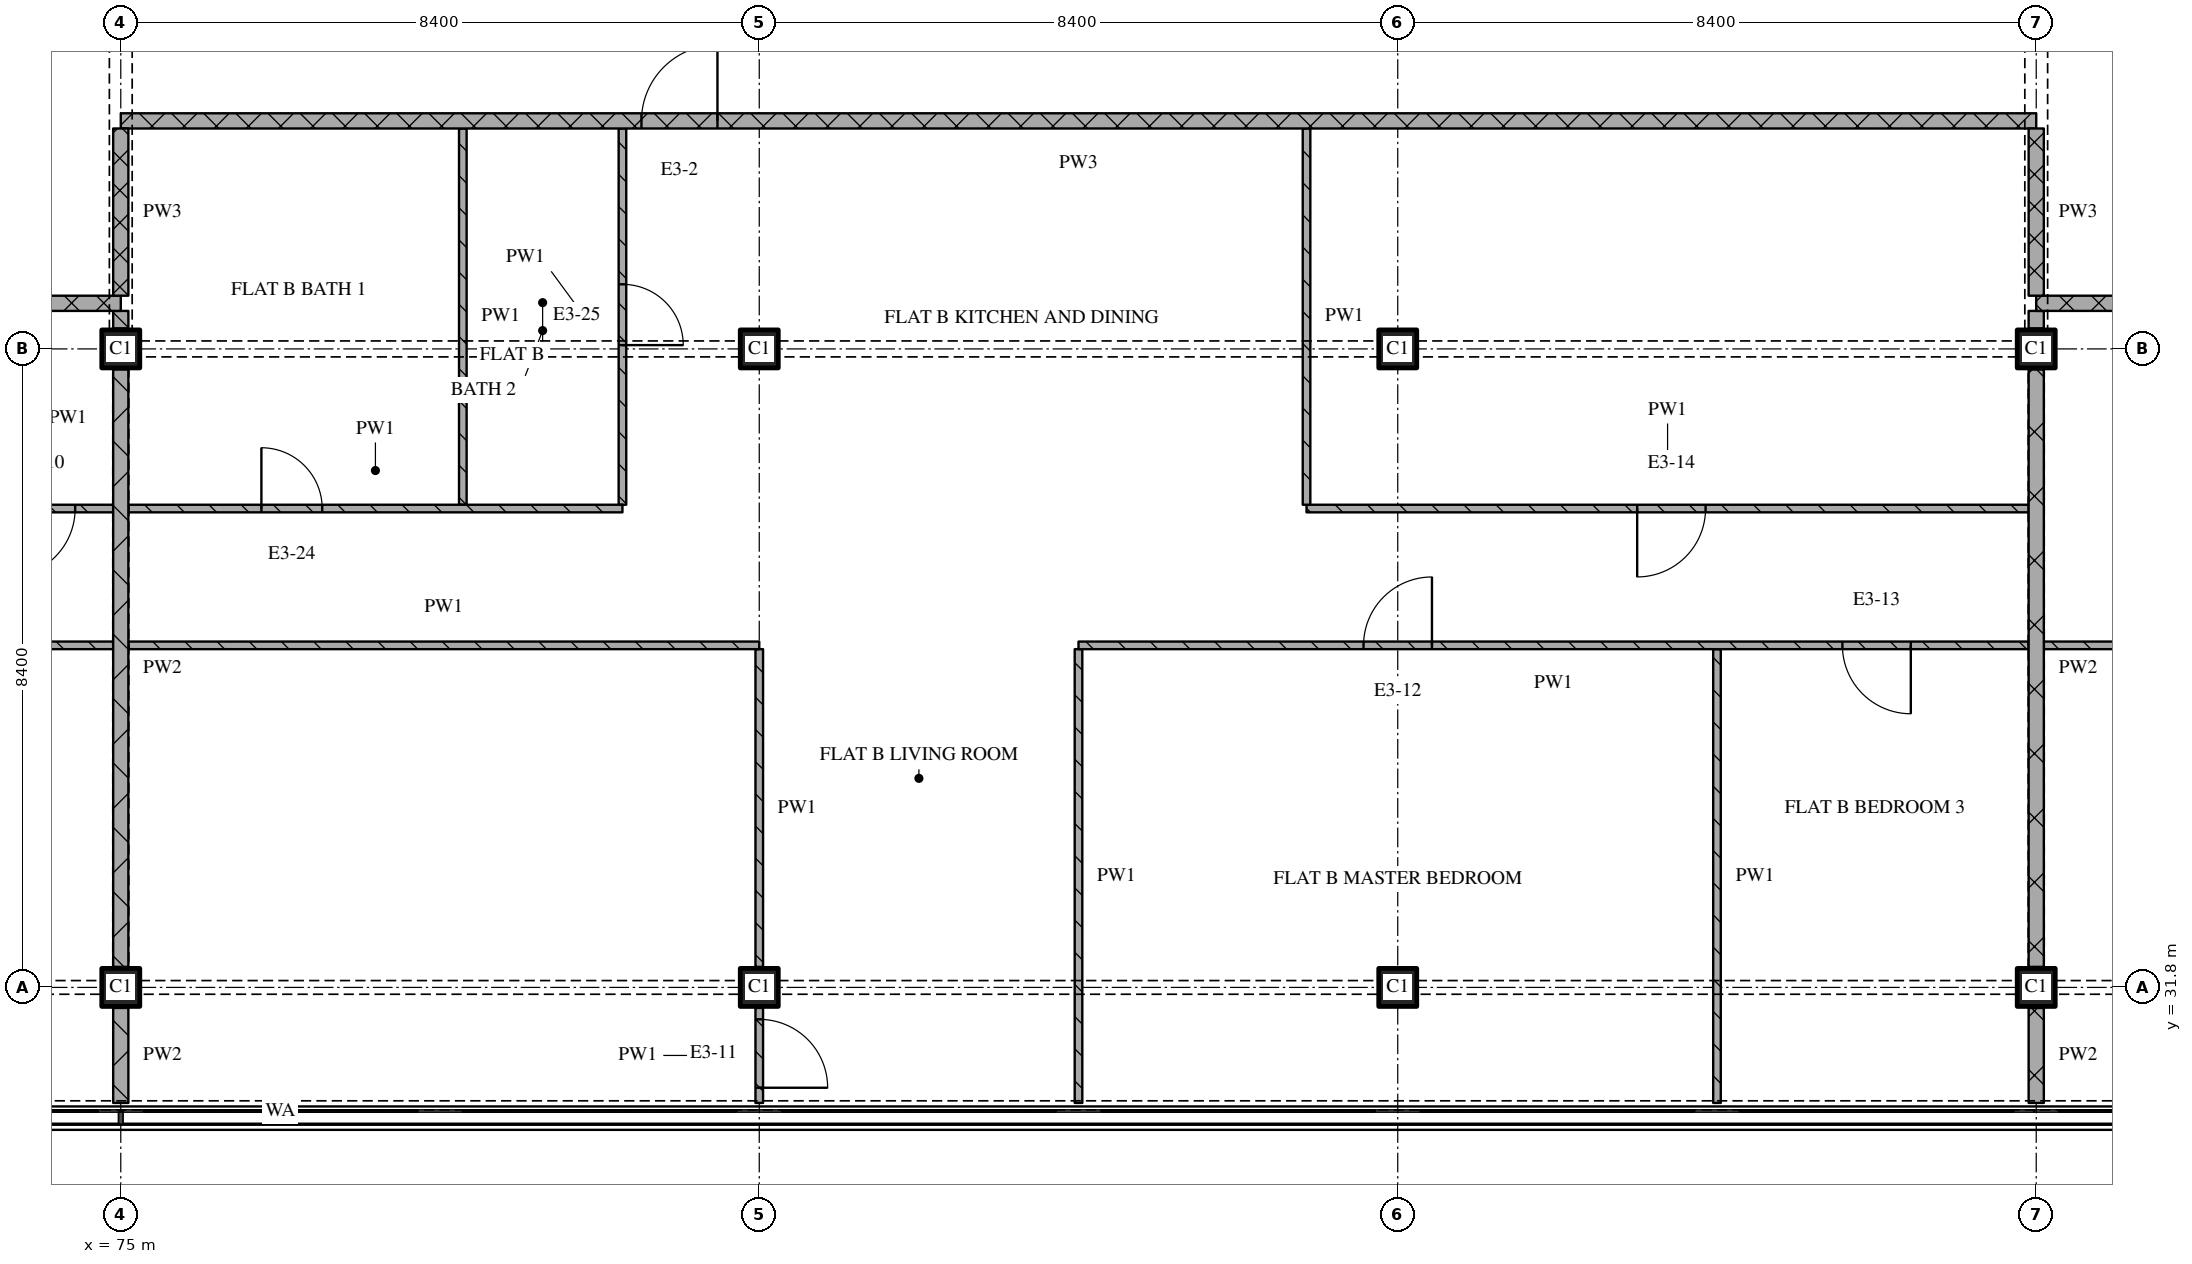
"""IFC4 building model, lengths in metres.
Left out: names, types, materials, properties, quantities, classifications, styles, units other than length and angle.
Written with IfcOpenShell. Run it as: python <this file> out.ifc"""

import sys

from ifc_helpers import new_model, si_unit, direction, frame, frame_2d, origin, origin_2d, place, context, subcontext, project, spatial, rectangle, extrude, element, fill, save


model = new_model("IFC4")
c1 = context("Model", 3, precision=1e-05, world=origin(), true_north=direction((0.0, 1.0)))
c2 = subcontext(c1, "Body", "Model", "MODEL_VIEW")
j1 = project(units=[si_unit("LENGTHUNIT", "METRE"), si_unit("PLANEANGLEUNIT", "RADIAN")], contexts=[c1])
p1 = place(None, origin())
s1 = spatial("IfcSite", under=j1, at=p1, CompositionType="ELEMENT")
p2 = place(p1, origin())
s2 = spatial("IfcBuilding", under=s1, at=p2, CompositionType="ELEMENT")
p3 = place(p2, frame((0.0, 0.0, 274.35)))
s3 = spatial("IfcBuildingStorey", under=s2, at=p3, CompositionType="ELEMENT", Elevation=274.35)
for number, where, z_axis, x_axis in (
    (1, (75.0, 31.8, 0.0), (0.0, 0.0, 1.0), (1.0, 0.0, 0.0)),
    (2, (75.0, 40.2, 0.0), (0.0, 0.0, 1.0), (1.0, 0.0, 0.0)),
    (3, (83.4, 31.8, 0.0), (0.0, 0.0, 1.0), (1.0, 0.0, 0.0)),
    (4, (83.4, 40.2, 0.0), (0.0, 0.0, 1.0), (1.0, 0.0, 0.0)),
    (5, (91.8, 31.8, 0.0), (0.0, 0.0, 1.0), (1.0, 0.0, 0.0)),
    (6, (91.8, 40.2, 0.0), (0.0, 0.0, 1.0), (1.0, 0.0, 0.0)),
    (7, (100.2, 31.8, 0.0), (0.0, 0.0, 1.0), (1.0, 0.0, 0.0)),
    (8, (100.2, 40.2, 0.0), (0.0, 0.0, 1.0), (1.0, 0.0, 0.0)),
):
    element("IfcColumn", number, at=place(p3, frame(where, z_axis=z_axis, x_axis=x_axis)), inside=s3, PredefinedType="COLUMN", context=c2, shape_type="SweptSolid", body=[
        extrude(rectangle(XDim=0.5, YDim=0.5, at=origin_2d()), origin(), (0.0, 0.0, 1.0), 3.6),
    ])
p4 = place(p3, frame((90.6, 38.1, 0.0), z_axis=(0.0, 0.0, 1.0), x_axis=(1.0, 0.0, 0.0)))
e9 = element("IfcWall", 9, at=p4, inside=s3, PredefinedType="PARTITIONING", context=c2, shape_type="SweptSolid", body=[
    extrude(rectangle(XDim=9.5, YDim=0.1, at=frame_2d((4.75, 0.0))), origin(), (0.0, 0.0, 1.0), 3.32),
])
p5 = place(p4, frame((4.35, 0.0, 0.0)))
e10 = element("IfcOpeningElement", 10, at=p5, cuts=e9, PredefinedType="OPENING", context=c2, shape_type="SweptSolid", body=[
    extrude(rectangle(XDim=0.9, YDim=2.1, at=frame_2d((0.45, 1.05))), frame((0.0, 0.06, 0.0), z_axis=(0.0, -1.0, 0.0), x_axis=(1.0, 0.0, 0.0)), (0.0, 0.0, 1.0), 0.12),
])
p6 = place(p3, frame((75.0, 40.8, 0.0), z_axis=(0.0, 0.0, 1.0), x_axis=(-1.0, 0.0, 0.0)))
e11 = element("IfcWall", 11, at=p6, inside=s3, PredefinedType="PARTITIONING", context=c2, shape_type="SweptSolid", body=[
    extrude(rectangle(XDim=18.32, YDim=0.2, at=frame_2d((9.16, 0.0))), origin(), (0.0, 0.0, 1.0), 3.32),
])
p7 = place(p6, frame((9.85, 0.0, 0.0)))
e12 = element("IfcOpeningElement", 12, at=p7, cuts=e11, PredefinedType="OPENING", context=c2, shape_type="SweptSolid", body=[
    extrude(rectangle(XDim=1.0, YDim=2.1, at=frame_2d((0.5, 1.05))), frame((0.0, 0.11, 0.0), z_axis=(0.0, -1.0, 0.0), x_axis=(1.0, 0.0, 0.0)), (0.0, 0.0, 1.0), 0.22),
])
p8 = place(p3, frame((118.52, 40.8, 0.0), z_axis=(0.0, 0.0, 1.0), x_axis=(-1.0, 0.0, 0.0)))
e13 = element("IfcWall", 13, at=p8, inside=s3, PredefinedType="PARTITIONING", context=c2, shape_type="SweptSolid", body=[
    extrude(rectangle(XDim=18.32, YDim=0.2, at=frame_2d((9.16, 0.0))), origin(), (0.0, 0.0, 1.0), 3.32),
])
p9 = place(p8, frame((7.77, 0.0, 0.0)))
e14 = element("IfcOpeningElement", 14, at=p9, cuts=e13, PredefinedType="OPENING", context=c2, shape_type="SweptSolid", body=[
    extrude(rectangle(XDim=1.0, YDim=2.1, at=frame_2d((0.5, 1.05))), frame((0.0, 0.11, 0.0), z_axis=(0.0, -1.0, 0.0), x_axis=(1.0, 0.0, 0.0)), (0.0, 0.0, 1.0), 0.22),
])
p10 = place(p3, frame((100.2, 43.2, 0.0), z_axis=(0.0, 0.0, 1.0), x_axis=(-1.0, 0.0, 0.0)))
e15 = element("IfcWall", 15, at=p10, inside=s3, PredefinedType="PARTITIONING", context=c2, shape_type="SweptSolid", body=[
    extrude(rectangle(XDim=25.2, YDim=0.2, at=frame_2d((12.6, 0.0))), origin(), (0.0, 0.0, 1.0), 3.32),
])
p11 = place(p10, frame((17.35, 0.0, 0.0)))
e16 = element("IfcOpeningElement", 16, at=p11, cuts=e15, PredefinedType="OPENING", context=c2, shape_type="SweptSolid", body=[
    extrude(rectangle(XDim=1.0, YDim=2.1, at=frame_2d((0.5, 1.05))), frame((0.0, 0.11, 0.0), z_axis=(0.0, -1.0, 0.0), x_axis=(1.0, 0.0, 0.0)), (0.0, 0.0, 1.0), 0.22),
])
p12 = place(p3, frame((75.0, 43.1, 0.0), z_axis=(0.0, 0.0, 1.0), x_axis=(0.0, -1.0, 0.0)))
e17 = element("IfcWall", 17, at=p12, inside=s3, PredefinedType="PARTITIONING", context=c2, shape_type="SweptSolid", body=[
    extrude(rectangle(XDim=2.2, YDim=0.2, at=frame_2d((1.1, 0.0))), origin(), (0.0, 0.0, 1.0), 2.53),
])
p13 = place(p3, frame((75.0, 31.53, 0.0), z_axis=(0.0, 0.0, 1.0), x_axis=(0.0, -1.0, 0.0)))
e18 = element("IfcWall", 18, at=p13, inside=s3, PredefinedType="PARTITIONING", context=c2, shape_type="SweptSolid", body=[
    extrude(rectangle(XDim=1.25, YDim=0.2, at=frame_2d((0.625, 0.0))), origin(), (0.0, 0.0, 1.0), 3.32),
])
p14 = place(p3, frame((75.0, 39.93, 0.0), z_axis=(0.0, 0.0, 1.0), x_axis=(0.0, -1.0, 0.0)))
e19 = element("IfcWall", 19, at=p14, inside=s3, PredefinedType="PARTITIONING", context=c2, shape_type="SweptSolid", body=[
    extrude(rectangle(XDim=7.86, YDim=0.2, at=frame_2d((3.93, 0.0))), origin(), (0.0, 0.0, 1.0), 2.77),
])
p15 = place(p3, frame((75.0, 40.7, 0.0), z_axis=(0.0, 0.0, 1.0), x_axis=(0.0, -1.0, 0.0)))
e20 = element("IfcWall", 20, at=p15, inside=s3, PredefinedType="PARTITIONING", context=c2, shape_type="SweptSolid", body=[
    extrude(rectangle(XDim=0.23, YDim=0.2, at=frame_2d((0.115, 0.0))), origin(), (0.0, 0.0, 1.0), 3.32),
])
p16 = place(p3, frame((79.5, 43.1, 0.0), z_axis=(0.0, 0.0, 1.0), x_axis=(0.0, -1.0, 0.0)))
e21 = element("IfcWall", 21, at=p16, inside=s3, PredefinedType="PARTITIONING", context=c2, shape_type="SweptSolid", body=[
    extrude(rectangle(XDim=4.95, YDim=0.1, at=frame_2d((2.475, 0.0))), origin(), (0.0, 0.0, 1.0), 3.32),
])
p17 = place(p3, frame((81.6, 38.15, 0.0), z_axis=(0.0, 0.0, 1.0), x_axis=(0.0, 1.0, 0.0)))
e22 = element("IfcWall", 22, at=p17, inside=s3, PredefinedType="PARTITIONING", context=c2, shape_type="SweptSolid", body=[
    extrude(rectangle(XDim=4.95, YDim=0.1, at=frame_2d((2.475, 0.0))), origin(), (0.0, 0.0, 1.0), 3.32),
])
p18 = place(p17, frame((2.1, 0.0, 0.0)))
e23 = element("IfcOpeningElement", 23, at=p18, cuts=e22, PredefinedType="OPENING", context=c2, shape_type="SweptSolid", body=[
    extrude(rectangle(XDim=0.8, YDim=2.1, at=frame_2d((0.4, 1.05))), frame((0.0, 0.06, 0.0), z_axis=(0.0, -1.0, 0.0), x_axis=(1.0, 0.0, 0.0)), (0.0, 0.0, 1.0), 0.12),
])
p19 = place(p3, frame((83.4, 30.28, 0.0), z_axis=(0.0, 0.0, 1.0), x_axis=(0.0, 1.0, 0.0)))
e24 = element("IfcWall", 24, at=p19, inside=s3, PredefinedType="PARTITIONING", context=c2, shape_type="SweptSolid", body=[
    extrude(rectangle(XDim=1.25, YDim=0.1, at=frame_2d((0.625, 0.0))), origin(), (0.0, 0.0, 1.0), 3.32),
])
p20 = place(p19, frame((0.2, 0.0, 0.0)))
e25 = element("IfcOpeningElement", 25, at=p20, cuts=e24, PredefinedType="OPENING", context=c2, shape_type="SweptSolid", body=[
    extrude(rectangle(XDim=0.9, YDim=2.1, at=frame_2d((0.45, 1.05))), frame((0.0, 0.06, 0.0), z_axis=(0.0, -1.0, 0.0), x_axis=(1.0, 0.0, 0.0)), (0.0, 0.0, 1.0), 0.12),
])
p21 = place(p3, frame((83.4, 36.25, 0.0), z_axis=(0.0, 0.0, 1.0), x_axis=(0.0, -1.0, 0.0)))
e26 = element("IfcWall", 26, at=p21, inside=s3, PredefinedType="PARTITIONING", context=c2, shape_type="SweptSolid", body=[
    extrude(rectangle(XDim=4.18, YDim=0.1, at=frame_2d((2.09, 0.0))), origin(), (0.0, 0.0, 1.0), 3.32),
])
p22 = place(p3, frame((87.6, 36.25, 0.0), z_axis=(0.0, 0.0, 1.0), x_axis=(0.0, -1.0, 0.0)))
e27 = element("IfcWall", 27, at=p22, inside=s3, PredefinedType="PARTITIONING", context=c2, shape_type="SweptSolid", body=[
    extrude(rectangle(XDim=5.97, YDim=0.1, at=frame_2d((2.985, 0.0))), origin(), (0.0, 0.0, 1.0), 3.32),
])
p23 = place(p3, frame((90.6, 43.1, 0.0), z_axis=(0.0, 0.0, 1.0), x_axis=(0.0, -1.0, 0.0)))
e28 = element("IfcWall", 28, at=p23, inside=s3, PredefinedType="PARTITIONING", context=c2, shape_type="SweptSolid", body=[
    extrude(rectangle(XDim=4.95, YDim=0.1, at=frame_2d((2.475, 0.0))), origin(), (0.0, 0.0, 1.0), 3.32),
])
p24 = place(p3, frame((96.0, 36.25, 0.0), z_axis=(0.0, 0.0, 1.0), x_axis=(0.0, -1.0, 0.0)))
e29 = element("IfcWall", 29, at=p24, inside=s3, PredefinedType="PARTITIONING", context=c2, shape_type="SweptSolid", body=[
    extrude(rectangle(XDim=5.97, YDim=0.1, at=frame_2d((2.985, 0.0))), origin(), (0.0, 0.0, 1.0), 3.32),
])
p25 = place(p3, frame((100.2, 43.1, 0.0), z_axis=(0.0, 0.0, 1.0), x_axis=(0.0, -1.0, 0.0)))
e30 = element("IfcWall", 30, at=p25, inside=s3, PredefinedType="PARTITIONING", context=c2, shape_type="SweptSolid", body=[
    extrude(rectangle(XDim=2.2, YDim=0.2, at=frame_2d((1.1, 0.0))), origin(), (0.0, 0.0, 1.0), 2.53),
])
p26 = place(p3, frame((100.2, 31.53, 0.0), z_axis=(0.0, 0.0, 1.0), x_axis=(0.0, -1.0, 0.0)))
e31 = element("IfcWall", 31, at=p26, inside=s3, PredefinedType="PARTITIONING", context=c2, shape_type="SweptSolid", body=[
    extrude(rectangle(XDim=1.25, YDim=0.2, at=frame_2d((0.625, 0.0))), origin(), (0.0, 0.0, 1.0), 3.32),
])
p27 = place(p3, frame((100.2, 39.93, 0.0), z_axis=(0.0, 0.0, 1.0), x_axis=(0.0, -1.0, 0.0)))
e32 = element("IfcWall", 32, at=p27, inside=s3, PredefinedType="PARTITIONING", context=c2, shape_type="SweptSolid", body=[
    extrude(rectangle(XDim=7.86, YDim=0.2, at=frame_2d((3.93, 0.0))), origin(), (0.0, 0.0, 1.0), 2.77),
])
p28 = place(p3, frame((100.2, 40.7, 0.0), z_axis=(0.0, 0.0, 1.0), x_axis=(0.0, -1.0, 0.0)))
e33 = element("IfcWall", 33, at=p28, inside=s3, PredefinedType="PARTITIONING", context=c2, shape_type="SweptSolid", body=[
    extrude(rectangle(XDim=0.23, YDim=0.2, at=frame_2d((0.115, 0.0))), origin(), (0.0, 0.0, 1.0), 3.32),
])
p29 = place(p3, frame((74.9, 36.3, 0.0), z_axis=(0.0, 0.0, 1.0), x_axis=(-1.0, 0.0, 0.0)))
e34 = element("IfcWall", 34, at=p29, inside=s3, PredefinedType="PARTITIONING", context=c2, shape_type="SweptSolid", body=[
    extrude(rectangle(XDim=8.3, YDim=0.1, at=frame_2d((4.15, 0.0))), origin(), (0.0, 0.0, 1.0), 3.32),
])
p30 = place(p29, frame((3.65, 0.0, 0.0)))
e35 = element("IfcOpeningElement", 35, at=p30, cuts=e34, PredefinedType="OPENING", context=c2, shape_type="SweptSolid", body=[
    extrude(rectangle(XDim=0.9, YDim=2.1, at=frame_2d((0.45, 1.05))), frame((0.0, 0.06, 0.0), z_axis=(0.0, -1.0, 0.0), x_axis=(1.0, 0.0, 0.0)), (0.0, 0.0, 1.0), 0.12),
])
p31 = place(p3, frame((75.1, 36.3, 0.0), z_axis=(0.0, 0.0, 1.0), x_axis=(1.0, 0.0, 0.0)))
e36 = element("IfcWall", 36, at=p31, inside=s3, PredefinedType="PARTITIONING", context=c2, shape_type="SweptSolid", body=[
    extrude(rectangle(XDim=8.3, YDim=0.1, at=frame_2d((4.15, 0.0))), origin(), (0.0, 0.0, 1.0), 3.32),
])
p32 = place(p3, frame((100.1, 36.3, 0.0), z_axis=(0.0, 0.0, 1.0), x_axis=(-1.0, 0.0, 0.0)))
e37 = element("IfcWall", 37, at=p32, inside=s3, PredefinedType="PARTITIONING", context=c2, shape_type="SweptSolid", body=[
    extrude(rectangle(XDim=12.5, YDim=0.1, at=frame_2d((6.25, 0.0))), origin(), (0.0, 0.0, 1.0), 3.32),
])
p33 = place(p32, frame((1.55, 0.0, 0.0)))
e38 = element("IfcOpeningElement", 38, at=p33, cuts=e37, PredefinedType="OPENING", context=c2, shape_type="SweptSolid", body=[
    extrude(rectangle(XDim=0.9, YDim=2.1, at=frame_2d((0.45, 1.05))), frame((0.0, 0.06, 0.0), z_axis=(0.0, -1.0, 0.0), x_axis=(1.0, 0.0, 0.0)), (0.0, 0.0, 1.0), 0.12),
])
p34 = place(p32, frame((7.85, 0.0, 0.0)))
e39 = element("IfcOpeningElement", 39, at=p34, cuts=e37, PredefinedType="OPENING", context=c2, shape_type="SweptSolid", body=[
    extrude(rectangle(XDim=0.9, YDim=2.1, at=frame_2d((0.45, 1.05))), frame((0.0, 0.06, 0.0), z_axis=(0.0, -1.0, 0.0), x_axis=(1.0, 0.0, 0.0)), (0.0, 0.0, 1.0), 0.12),
])
p35 = place(p3, frame((100.3, 36.3, 0.0), z_axis=(0.0, 0.0, 1.0), x_axis=(1.0, 0.0, 0.0)))
e40 = element("IfcWall", 40, at=p35, inside=s3, PredefinedType="PARTITIONING", context=c2, shape_type="SweptSolid", body=[
    extrude(rectangle(XDim=8.3, YDim=0.1, at=frame_2d((4.15, 0.0))), origin(), (0.0, 0.0, 1.0), 3.32),
])
p36 = place(p3, frame((72.9, 38.1, 0.0), z_axis=(0.0, 0.0, 1.0), x_axis=(1.0, 0.0, 0.0)))
e41 = element("IfcWall", 41, at=p36, inside=s3, PredefinedType="PARTITIONING", context=c2, shape_type="SweptSolid", body=[
    extrude(rectangle(XDim=2.0, YDim=0.1, at=frame_2d((1.0, 0.0))), origin(), (0.0, 0.0, 1.0), 3.32),
])
p37 = place(p36, frame((0.6, 0.0, 0.0)))
e42 = element("IfcOpeningElement", 42, at=p37, cuts=e41, PredefinedType="OPENING", context=c2, shape_type="SweptSolid", body=[
    extrude(rectangle(XDim=0.9, YDim=2.1, at=frame_2d((0.45, 1.05))), frame((0.0, 0.06, 0.0), z_axis=(0.0, -1.0, 0.0), x_axis=(1.0, 0.0, 0.0)), (0.0, 0.0, 1.0), 0.12),
])
p38 = place(p3, frame((75.1, 38.1, 0.0), z_axis=(0.0, 0.0, 1.0), x_axis=(1.0, 0.0, 0.0)))
e43 = element("IfcWall", 43, at=p38, inside=s3, PredefinedType="PARTITIONING", context=c2, shape_type="SweptSolid", body=[
    extrude(rectangle(XDim=6.5, YDim=0.1, at=frame_2d((3.25, 0.0))), origin(), (0.0, 0.0, 1.0), 3.32),
])
p39 = place(p38, frame((1.75, 0.0, 0.0)))
e44 = element("IfcOpeningElement", 44, at=p39, cuts=e43, PredefinedType="OPENING", context=c2, shape_type="SweptSolid", body=[
    extrude(rectangle(XDim=0.8, YDim=2.1, at=frame_2d((0.4, 1.05))), frame((0.0, 0.06, 0.0), z_axis=(0.0, -1.0, 0.0), x_axis=(1.0, 0.0, 0.0)), (0.0, 0.0, 1.0), 0.12),
])
p40 = place(p5, origin())
e45 = element("IfcDoor", 45, at=p40, inside=s3, OperationType="SINGLE_SWING_RIGHT", PredefinedType="DOOR", context=c2, shape_type="SweptSolid", body=[
    extrude(rectangle(XDim=0.9, YDim=2.1, at=frame_2d((0.45, 1.05))), frame((0.0, 0.025, 0.0), z_axis=(0.0, -1.0, 0.0), x_axis=(1.0, 0.0, 0.0)), (0.0, 0.0, 1.0), 0.05),
])
fill(e10, e45)
p41 = place(p11, origin())
e46 = element("IfcDoor", 46, at=p41, inside=s3, OperationType="SINGLE_SWING_RIGHT", PredefinedType="DOOR", context=c2, shape_type="SweptSolid", body=[
    extrude(rectangle(XDim=1.0, YDim=2.1, at=frame_2d((0.5, 1.05))), frame((0.0, 0.025, 0.0), z_axis=(0.0, -1.0, 0.0), x_axis=(1.0, 0.0, 0.0)), (0.0, 0.0, 1.0), 0.05),
])
fill(e16, e46)
p42 = place(p18, origin())
e47 = element("IfcDoor", 47, at=p42, inside=s3, OperationType="SINGLE_SWING_RIGHT", PredefinedType="DOOR", context=c2, shape_type="SweptSolid", body=[
    extrude(rectangle(XDim=0.8, YDim=2.1, at=frame_2d((0.4, 1.05))), frame((0.0, 0.025, 0.0), z_axis=(0.0, -1.0, 0.0), x_axis=(1.0, 0.0, 0.0)), (0.0, 0.0, 1.0), 0.05),
])
fill(e23, e47)
p43 = place(p20, origin())
e48 = element("IfcDoor", 48, at=p43, inside=s3, OperationType="SINGLE_SWING_RIGHT", PredefinedType="DOOR", context=c2, shape_type="SweptSolid", body=[
    extrude(rectangle(XDim=0.9, YDim=2.1, at=frame_2d((0.45, 1.05))), frame((0.0, 0.025, 0.0), z_axis=(0.0, -1.0, 0.0), x_axis=(1.0, 0.0, 0.0)), (0.0, 0.0, 1.0), 0.05),
])
fill(e25, e48)
p44 = place(p33, origin())
e49 = element("IfcDoor", 49, at=p44, inside=s3, OperationType="SINGLE_SWING_LEFT", PredefinedType="DOOR", context=c2, shape_type="SweptSolid", body=[
    extrude(rectangle(XDim=0.9, YDim=2.1, at=frame_2d((0.45, 1.05))), frame((0.0, 0.025, 0.0), z_axis=(0.0, -1.0, 0.0), x_axis=(1.0, 0.0, 0.0)), (0.0, 0.0, 1.0), 0.05),
])
fill(e38, e49)
p45 = place(p34, origin())
e50 = element("IfcDoor", 50, at=p45, inside=s3, OperationType="SINGLE_SWING_RIGHT", PredefinedType="DOOR", context=c2, shape_type="SweptSolid", body=[
    extrude(rectangle(XDim=0.9, YDim=2.1, at=frame_2d((0.45, 1.05))), frame((0.0, 0.025, 0.0), z_axis=(0.0, -1.0, 0.0), x_axis=(1.0, 0.0, 0.0)), (0.0, 0.0, 1.0), 0.05),
])
fill(e39, e50)
p46 = place(p37, origin())
e51 = element("IfcDoor", 51, at=p46, inside=s3, OperationType="SINGLE_SWING_RIGHT", PredefinedType="DOOR", context=c2, shape_type="SweptSolid", body=[
    extrude(rectangle(XDim=0.9, YDim=2.1, at=frame_2d((0.45, 1.05))), frame((0.0, 0.025, 0.0), z_axis=(0.0, -1.0, 0.0), x_axis=(1.0, 0.0, 0.0)), (0.0, 0.0, 1.0), 0.05),
])
fill(e42, e51)
p47 = place(p39, origin())
e52 = element("IfcDoor", 52, at=p47, inside=s3, OperationType="SINGLE_SWING_LEFT", PredefinedType="DOOR", context=c2, shape_type="SweptSolid", body=[
    extrude(rectangle(XDim=0.8, YDim=2.1, at=frame_2d((0.4, 1.05))), frame((0.0, 0.025, 0.0), z_axis=(0.0, -1.0, 0.0), x_axis=(1.0, 0.0, 0.0)), (0.0, 0.0, 1.0), 0.05),
])
fill(e44, e52)
save(model, sys.argv[1])
